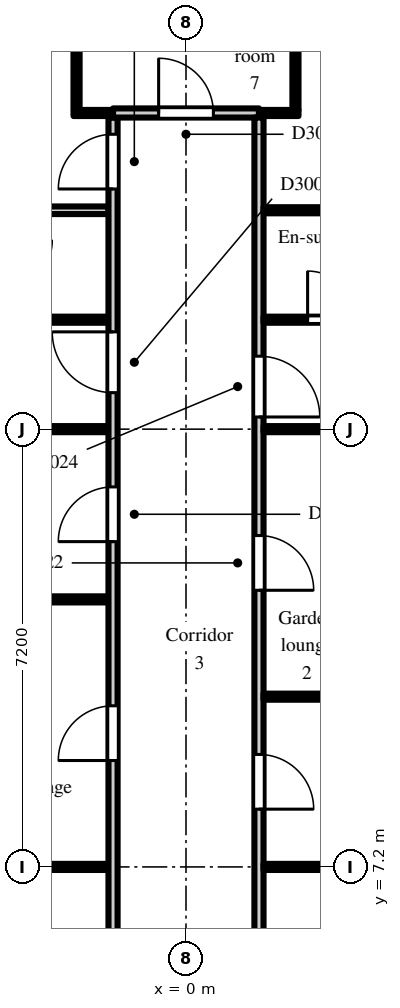
"""IFC4 building model, lengths in metres.
Left out: names, types, materials, properties, quantities, classifications, styles, units other than length and angle.
Written with IfcOpenShell. Run it as: python <this file> out.ifc"""

import sys

from ifc_helpers import new_model, si_unit, direction, frame, frame_2d, origin, place, context, subcontext, project, spatial, rectangle, extrude, element, fill, save


model = new_model("IFC4")
c1 = context("Model", 3, precision=1e-05, world=origin(), true_north=direction((0.0, 1.0)))
c2 = subcontext(c1, "Body", "Model", "MODEL_VIEW")
j1 = project(units=[si_unit("LENGTHUNIT", "METRE"), si_unit("PLANEANGLEUNIT", "RADIAN")], contexts=[c1])
p1 = place(None, origin())
s1 = spatial("IfcSite", under=j1, at=p1, CompositionType="ELEMENT")
p2 = place(p1, origin())
s2 = spatial("IfcBuilding", under=s1, at=p2, CompositionType="ELEMENT")
p3 = place(p2, frame((0.0, 0.0, 207.9)))
s3 = spatial("IfcBuildingStorey", under=s2, at=p3, CompositionType="ELEMENT", Elevation=207.9)
for number, where, z_axis, x_axis in (
    (1, (-3.9, 7.2, 0.0), (0.0, 0.0, 1.0), (1.0, 0.0, 0.0)),
    (2, (-3.9, 11.6, 0.0), (0.0, 0.0, 1.0), (1.0, 0.0, 0.0)),
    (3, (-3.9, 14.4, 0.0), (0.0, 0.0, 1.0), (1.0, 0.0, 0.0)),
):
    element("IfcWall", number, at=place(p3, frame(where, z_axis=z_axis, x_axis=x_axis)), inside=s3, PredefinedType="PARTITIONING", context=c2, shape_type="SweptSolid", body=[
        extrude(rectangle(XDim=2.625, YDim=0.1, at=frame_2d((1.312, 0.0))), origin(), (0.0, 0.0, 1.0), 2.6),
    ])
p4 = place(p3, frame((-2.95, 16.2, 0.0), z_axis=(0.0, 0.0, 1.0), x_axis=(1.0, 0.0, 0.0)))
e4 = element("IfcWall", 4, at=p4, inside=s3, PredefinedType="PARTITIONING", context=c2, shape_type="SweptSolid", body=[
    extrude(rectangle(XDim=1.675, YDim=0.1, at=frame_2d((0.837, 0.0))), origin(), (0.0, 0.0, 1.0), 2.6),
])
p5 = place(p3, frame((-3.0, 18.0, 0.0), z_axis=(0.0, 0.0, 1.0), x_axis=(1.0, 0.0, 0.0)))
e5 = element("IfcWall", 5, at=p5, inside=s3, PredefinedType="PARTITIONING", context=c2, shape_type="SweptSolid", body=[
    extrude(rectangle(XDim=1.725, YDim=0.125, at=frame_2d((0.863, 0.0))), origin(), (0.0, 0.0, 1.0), 2.6),
])
p6 = place(p3, frame((-1.8, 19.55, 0.0), z_axis=(0.0, 0.0, 1.0), x_axis=(0.0, 1.0, 0.0)))
e6 = element("IfcWall", 6, at=p6, inside=s3, PredefinedType="PARTITIONING", context=c2, shape_type="SweptSolid", body=[
    extrude(rectangle(XDim=1.75, YDim=0.1, at=frame_2d((0.875, 0.0))), origin(), (0.0, 0.0, 1.0), 2.6),
])
p7 = place(p3, frame((-1.75, 19.6, 0.0), z_axis=(0.0, 0.0, 1.0), x_axis=(1.0, 0.0, 0.0)))
e7 = element("IfcWall", 7, at=p7, inside=s3, PredefinedType="PARTITIONING", context=c2, shape_type="SweptSolid", body=[
    extrude(rectangle(XDim=0.55, YDim=0.1, at=frame_2d((0.275, 0.0))), origin(), (0.0, 0.0, 1.0), 2.6),
])
p8 = place(p3, frame((-1.2, 1.275, 0.0), z_axis=(0.0, 0.0, 1.0), x_axis=(0.0, 1.0, 0.0)))
e8 = element("IfcWall", 8, at=p8, inside=s3, PredefinedType="PARTITIONING", context=c2, shape_type="SweptSolid", body=[
    extrude(rectangle(XDim=18.25, YDim=0.15, at=frame_2d((9.125, 0.0))), origin(), (0.0, 0.0, 1.0), 2.6),
])
p9 = place(p8, frame((2.475, 0.0, 0.0)))
e9 = element("IfcOpeningElement", 9, at=p9, cuts=e8, PredefinedType="OPENING", context=c2, shape_type="SweptSolid", body=[
    extrude(rectangle(XDim=0.9, YDim=2.1, at=frame_2d((0.45, 1.05))), frame((0.0, 0.085, 0.0), z_axis=(0.0, -1.0, 0.0), x_axis=(1.0, 0.0, 0.0)), (0.0, 0.0, 1.0), 0.17),
])
p10 = place(p8, frame((11.275, 0.0, 0.0)))
e10 = element("IfcOpeningElement", 10, at=p10, cuts=e8, PredefinedType="OPENING", context=c2, shape_type="SweptSolid", body=[
    extrude(rectangle(XDim=0.9, YDim=2.1, at=frame_2d((0.45, 1.05))), frame((0.0, 0.085, 0.0), z_axis=(0.0, -1.0, 0.0), x_axis=(1.0, 0.0, 0.0)), (0.0, 0.0, 1.0), 0.17),
])
p11 = place(p8, frame((7.675, 0.0, 0.0)))
e11 = element("IfcOpeningElement", 11, at=p11, cuts=e8, PredefinedType="OPENING", context=c2, shape_type="SweptSolid", body=[
    extrude(rectangle(XDim=0.9, YDim=2.1, at=frame_2d((0.45, 1.05))), frame((0.0, 0.085, 0.0), z_axis=(0.0, -1.0, 0.0), x_axis=(1.0, 0.0, 0.0)), (0.0, 0.0, 1.0), 0.17),
])
p12 = place(p8, frame((13.725, 0.0, 0.0)))
e12 = element("IfcOpeningElement", 12, at=p12, cuts=e8, PredefinedType="OPENING", context=c2, shape_type="SweptSolid", body=[
    extrude(rectangle(XDim=1.0, YDim=2.1, at=frame_2d((0.5, 1.05))), frame((0.0, 0.085, 0.0), z_axis=(0.0, -1.0, 0.0), x_axis=(1.0, 0.0, 0.0)), (0.0, 0.0, 1.0), 0.17),
])
p13 = place(p8, frame((17.075, 0.0, 0.0)))
e13 = element("IfcOpeningElement", 13, at=p13, cuts=e8, PredefinedType="OPENING", context=c2, shape_type="SweptSolid", body=[
    extrude(rectangle(XDim=0.9, YDim=2.1, at=frame_2d((0.45, 1.05))), frame((0.0, 0.085, 0.0), z_axis=(0.0, -1.0, 0.0), x_axis=(1.0, 0.0, 0.0)), (0.0, 0.0, 1.0), 0.17),
])
p14 = place(p3, frame((-1.2, 19.6, 0.0), z_axis=(0.0, 0.0, 1.0), x_axis=(1.0, 0.0, 0.0)))
e14 = element("IfcWall", 14, at=p14, inside=s3, PredefinedType="PARTITIONING", context=c2, shape_type="SweptSolid", body=[
    extrude(rectangle(XDim=2.4, YDim=0.15, at=frame_2d((1.2, 0.0))), origin(), (0.0, 0.0, 1.0), 2.6),
])
p15 = place(p14, frame((0.75, 0.0, 0.0)))
e15 = element("IfcOpeningElement", 15, at=p15, cuts=e14, PredefinedType="OPENING", context=c2, shape_type="SweptSolid", body=[
    extrude(rectangle(XDim=0.9, YDim=2.1, at=frame_2d((0.45, 1.05))), frame((0.0, 0.085, 0.0), z_axis=(0.0, -1.0, 0.0), x_axis=(1.0, 0.0, 0.0)), (0.0, 0.0, 1.0), 0.17),
])
p16 = place(p3, frame((1.2, 1.125, 0.0), z_axis=(0.0, 0.0, 1.0), x_axis=(0.0, 1.0, 0.0)))
e16 = element("IfcWall", 16, at=p16, inside=s3, PredefinedType="PARTITIONING", context=c2, shape_type="SweptSolid", body=[
    extrude(rectangle(XDim=18.4, YDim=0.15, at=frame_2d((9.2, 0.0))), origin(), (0.0, 0.0, 1.0), 2.6),
])
p17 = place(p16, frame((2.625, 0.0, 0.0)))
e17 = element("IfcOpeningElement", 17, at=p17, cuts=e16, PredefinedType="OPENING", context=c2, shape_type="SweptSolid", body=[
    extrude(rectangle(XDim=0.9, YDim=2.1, at=frame_2d((0.45, 1.05))), frame((0.0, 0.085, 0.0), z_axis=(0.0, -1.0, 0.0), x_axis=(1.0, 0.0, 0.0)), (0.0, 0.0, 1.0), 0.17),
])
p18 = place(p16, frame((7.025, 0.0, 0.0)))
e18 = element("IfcOpeningElement", 18, at=p18, cuts=e16, PredefinedType="OPENING", context=c2, shape_type="SweptSolid", body=[
    extrude(rectangle(XDim=0.9, YDim=2.1, at=frame_2d((0.45, 1.05))), frame((0.0, 0.085, 0.0), z_axis=(0.0, -1.0, 0.0), x_axis=(1.0, 0.0, 0.0)), (0.0, 0.0, 1.0), 0.17),
])
p19 = place(p16, frame((10.625, 0.0, 0.0)))
e19 = element("IfcOpeningElement", 19, at=p19, cuts=e16, PredefinedType="OPENING", context=c2, shape_type="SweptSolid", body=[
    extrude(rectangle(XDim=0.9, YDim=2.1, at=frame_2d((0.45, 1.05))), frame((0.0, 0.085, 0.0), z_axis=(0.0, -1.0, 0.0), x_axis=(1.0, 0.0, 0.0)), (0.0, 0.0, 1.0), 0.17),
])
p20 = place(p16, frame((13.475, 0.0, 0.0)))
e20 = element("IfcOpeningElement", 20, at=p20, cuts=e16, PredefinedType="OPENING", context=c2, shape_type="SweptSolid", body=[
    extrude(rectangle(XDim=1.0, YDim=2.1, at=frame_2d((0.5, 1.05))), frame((0.0, 0.085, 0.0), z_axis=(0.0, -1.0, 0.0), x_axis=(1.0, 0.0, 0.0)), (0.0, 0.0, 1.0), 0.17),
])
for number, where, z_axis, x_axis in (
    (21, (1.275, 7.2, 0.0), (0.0, 0.0, 1.0), (1.0, 0.0, 0.0)),
    (22, (1.275, 10.0, 0.0), (0.0, 0.0, 1.0), (1.0, 0.0, 0.0)),
    (23, (1.275, 14.4, 0.0), (0.0, 0.0, 1.0), (1.0, 0.0, 0.0)),
):
    element("IfcWall", number, at=place(p3, frame(where, z_axis=z_axis, x_axis=x_axis)), inside=s3, PredefinedType="PARTITIONING", context=c2, shape_type="SweptSolid", body=[
        extrude(rectangle(XDim=2.625, YDim=0.1, at=frame_2d((1.312, 0.0))), origin(), (0.0, 0.0, 1.0), 2.6),
    ])
p21 = place(p3, frame((1.275, 16.2, 0.0), z_axis=(0.0, 0.0, 1.0), x_axis=(1.0, 0.0, 0.0)))
e24 = element("IfcWall", 24, at=p21, inside=s3, PredefinedType="PARTITIONING", context=c2, shape_type="SweptSolid", body=[
    extrude(rectangle(XDim=2.375, YDim=0.1, at=frame_2d((1.188, 0.0))), origin(), (0.0, 0.0, 1.0), 2.6),
])
p22 = place(p21, frame((0.725, 0.0, 0.0)))
e25 = element("IfcOpeningElement", 25, at=p22, cuts=e24, PredefinedType="OPENING", context=c2, shape_type="SweptSolid", body=[
    extrude(rectangle(XDim=0.8, YDim=2.1, at=frame_2d((0.4, 1.05))), frame((0.0, 0.06, 0.0), z_axis=(0.0, -1.0, 0.0), x_axis=(1.0, 0.0, 0.0)), (0.0, 0.0, 1.0), 0.12),
])
p23 = place(p3, frame((1.275, 18.0, 0.0), z_axis=(0.0, 0.0, 1.0), x_axis=(1.0, 0.0, 0.0)))
e26 = element("IfcWall", 26, at=p23, inside=s3, PredefinedType="PARTITIONING", context=c2, shape_type="SweptSolid", body=[
    extrude(rectangle(XDim=2.375, YDim=0.1, at=frame_2d((1.188, 0.0))), origin(), (0.0, 0.0, 1.0), 2.6),
])
p24 = place(p3, frame((1.2, 19.6, 0.0), z_axis=(0.0, 0.0, 1.0), x_axis=(1.0, 0.0, 0.0)))
e27 = element("IfcWall", 27, at=p24, inside=s3, PredefinedType="PARTITIONING", context=c2, shape_type="SweptSolid", body=[
    extrude(rectangle(XDim=0.65, YDim=0.1, at=frame_2d((0.325, 0.0))), origin(), (0.0, 0.0, 1.0), 2.6),
])
p25 = place(p3, frame((1.8, 19.65, 0.0), z_axis=(0.0, 0.0, 1.0), x_axis=(0.0, 1.0, 0.0)))
e28 = element("IfcWall", 28, at=p25, inside=s3, PredefinedType="PARTITIONING", context=c2, shape_type="SweptSolid", body=[
    extrude(rectangle(XDim=1.65, YDim=0.1, at=frame_2d((0.825, 0.0))), origin(), (0.0, 0.0, 1.0), 2.6),
])
p26 = place(p15, origin())
e29 = element("IfcDoor", 29, at=p26, inside=s3, OperationType="SINGLE_SWING_LEFT", PredefinedType="DOOR", context=c2, shape_type="SweptSolid", body=[
    extrude(rectangle(XDim=0.9, YDim=2.1, at=frame_2d((0.45, 1.05))), frame((0.0, 0.025, 0.0), z_axis=(0.0, -1.0, 0.0), x_axis=(1.0, 0.0, 0.0)), (0.0, 0.0, 1.0), 0.05),
])
fill(e15, e29)
p27 = place(p10, origin())
e30 = element("IfcDoor", 30, at=p27, inside=s3, OperationType="SINGLE_SWING_LEFT", PredefinedType="DOOR", context=c2, shape_type="SweptSolid", body=[
    extrude(rectangle(XDim=0.9, YDim=2.1, at=frame_2d((0.45, 1.05))), frame((0.0, 0.025, 0.0), z_axis=(0.0, -1.0, 0.0), x_axis=(1.0, 0.0, 0.0)), (0.0, 0.0, 1.0), 0.05),
])
fill(e10, e30)
p28 = place(p11, origin())
e31 = element("IfcDoor", 31, at=p28, inside=s3, OperationType="SINGLE_SWING_LEFT", PredefinedType="DOOR", context=c2, shape_type="SweptSolid", body=[
    extrude(rectangle(XDim=0.9, YDim=2.1, at=frame_2d((0.45, 1.05))), frame((0.0, 0.025, 0.0), z_axis=(0.0, -1.0, 0.0), x_axis=(1.0, 0.0, 0.0)), (0.0, 0.0, 1.0), 0.05),
])
fill(e11, e31)
p29 = place(p12, origin())
e32 = element("IfcDoor", 32, at=p29, inside=s3, OperationType="SINGLE_SWING_RIGHT", PredefinedType="DOOR", context=c2, shape_type="SweptSolid", body=[
    extrude(rectangle(XDim=1.0, YDim=2.1, at=frame_2d((0.5, 1.05))), frame((0.0, 0.025, 0.0), z_axis=(0.0, -1.0, 0.0), x_axis=(1.0, 0.0, 0.0)), (0.0, 0.0, 1.0), 0.05),
])
fill(e12, e32)
p30 = place(p13, origin())
e33 = element("IfcDoor", 33, at=p30, inside=s3, OperationType="SINGLE_SWING_LEFT", PredefinedType="DOOR", context=c2, shape_type="SweptSolid", body=[
    extrude(rectangle(XDim=0.9, YDim=2.1, at=frame_2d((0.45, 1.05))), frame((0.0, 0.025, 0.0), z_axis=(0.0, -1.0, 0.0), x_axis=(1.0, 0.0, 0.0)), (0.0, 0.0, 1.0), 0.05),
])
fill(e13, e33)
p31 = place(p18, frame((0.9, 0.0, 0.0), z_axis=(0.0, 0.0, 1.0), x_axis=(-1.0, 0.0, 0.0)))
e34 = element("IfcDoor", 34, at=p31, inside=s3, OperationType="SINGLE_SWING_RIGHT", PredefinedType="DOOR", context=c2, shape_type="SweptSolid", body=[
    extrude(rectangle(XDim=0.9, YDim=2.1, at=frame_2d((0.45, 1.05))), frame((0.0, 0.025, 0.0), z_axis=(0.0, -1.0, 0.0), x_axis=(1.0, 0.0, 0.0)), (0.0, 0.0, 1.0), 0.05),
])
fill(e18, e34)
p32 = place(p19, frame((0.9, 0.0, 0.0), z_axis=(0.0, 0.0, 1.0), x_axis=(-1.0, 0.0, 0.0)))
e35 = element("IfcDoor", 35, at=p32, inside=s3, OperationType="SINGLE_SWING_RIGHT", PredefinedType="DOOR", context=c2, shape_type="SweptSolid", body=[
    extrude(rectangle(XDim=0.9, YDim=2.1, at=frame_2d((0.45, 1.05))), frame((0.0, 0.025, 0.0), z_axis=(0.0, -1.0, 0.0), x_axis=(1.0, 0.0, 0.0)), (0.0, 0.0, 1.0), 0.05),
])
fill(e19, e35)
p33 = place(p22, origin())
e36 = element("IfcDoor", 36, at=p33, inside=s3, OperationType="SINGLE_SWING_LEFT", PredefinedType="DOOR", context=c2, shape_type="SweptSolid", body=[
    extrude(rectangle(XDim=0.8, YDim=2.1, at=frame_2d((0.4, 1.05))), frame((0.0, 0.025, 0.0), z_axis=(0.0, -1.0, 0.0), x_axis=(1.0, 0.0, 0.0)), (0.0, 0.0, 1.0), 0.05),
])
fill(e25, e36)
p34 = place(p20, frame((1.0, 0.0, 0.0), z_axis=(0.0, 0.0, 1.0), x_axis=(-1.0, 0.0, 0.0)))
e37 = element("IfcDoor", 37, at=p34, inside=s3, OperationType="SINGLE_SWING_RIGHT", PredefinedType="DOOR", context=c2, shape_type="SweptSolid", body=[
    extrude(rectangle(XDim=1.0, YDim=2.1, at=frame_2d((0.5, 1.05))), frame((0.0, 0.025, 0.0), z_axis=(0.0, -1.0, 0.0), x_axis=(1.0, 0.0, 0.0)), (0.0, 0.0, 1.0), 0.05),
])
fill(e20, e37)
save(model, sys.argv[1])
